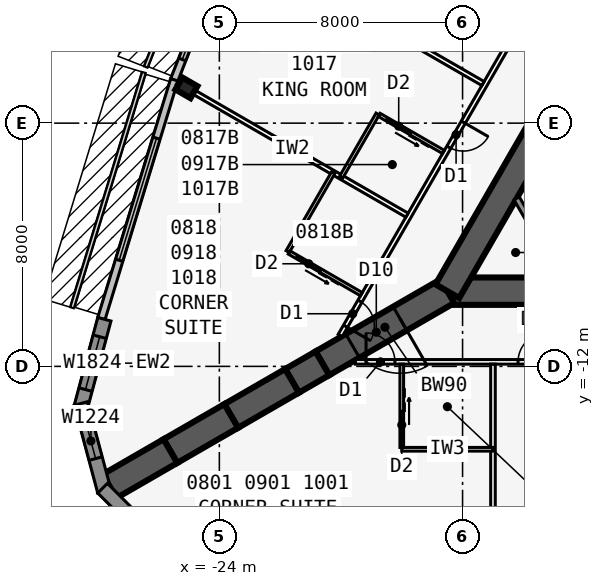
"""IFC4 building model, lengths in metres.
Left out: names, types, materials, properties, quantities, classifications, styles, units other than length and angle.
Written with IfcOpenShell. Run it as: python <this file> out.ifc"""

import sys

from ifc_helpers import new_model, si_unit, direction, frame, frame_2d, origin, origin_2d, place, context, subcontext, project, spatial, polyline, rectangle, i_section, outline, extrude, element, fill, save


model = new_model("IFC4")
c1 = context("Model", 3, precision=1e-05, world=origin(), true_north=direction((0.0, 1.0)))
c2 = subcontext(c1, "Body", "Model", "MODEL_VIEW")
j1 = project(units=[si_unit("LENGTHUNIT", "METRE"), si_unit("PLANEANGLEUNIT", "RADIAN")], contexts=[c1])
p1 = place(None, origin())
s1 = spatial("IfcSite", under=j1, at=p1, CompositionType="ELEMENT")
p2 = place(p1, origin())
s2 = spatial("IfcBuilding", under=s1, at=p2, CompositionType="ELEMENT")
p3 = place(p2, frame((0.0, 0.0, 38.7)))
s3 = spatial("IfcBuildingStorey", under=s2, at=p3, CompositionType="ELEMENT", Elevation=38.7)
p4 = place(p3, frame((-16.5, -9.526, 0.0), z_axis=(0.0, 0.0, 1.0), x_axis=(1.0, 0.0, 0.0)))
e1 = element("IfcWall", 1, at=p4, inside=s3, PredefinedType="SHEAR", context=c2, shape_type="SweptSolid", body=[
    extrude(rectangle(XDim=33.0, YDim=0.9, at=frame_2d((16.5, 0.0))), origin(), (0.0, 0.0, 1.0), 3.4),
])
p5 = place(p4, frame((14.05, 0.0, 0.0)))
e2 = element("IfcOpeningElement", 2, at=p5, cuts=e1, PredefinedType="OPENING", context=c2, shape_type="SweptSolid", body=[
    extrude(rectangle(XDim=1.8, YDim=2.13, at=frame_2d((0.9, 1.065))), frame((0.0, 0.46, 0.0), z_axis=(0.0, -1.0, 0.0), x_axis=(1.0, 0.0, 0.0)), (0.0, 0.0, 1.0), 0.92),
])
p6 = place(p3, frame((0.0, 19.052, 0.0), z_axis=(0.0, 0.0, 1.0), x_axis=(-0.499999749417, -0.866025548458, 0.0)))
e3 = element("IfcWall", 3, at=p6, inside=s3, PredefinedType="SHEAR", context=c2, shape_type="SweptSolid", body=[
    extrude(rectangle(XDim=33.0, YDim=0.9, at=frame_2d((16.5, 0.0))), origin(), (0.0, 0.0, 1.0), 3.4),
])
p7 = place(p6, frame((14.15, 0.0, 0.0)))
e4 = element("IfcOpeningElement", 4, at=p7, cuts=e3, PredefinedType="OPENING", context=c2, shape_type="SweptSolid", body=[
    extrude(rectangle(XDim=1.8, YDim=2.13, at=frame_2d((0.9, 1.065))), frame((0.0, 0.46, 0.0), z_axis=(0.0, -1.0, 0.0), x_axis=(1.0, 0.0, 0.0)), (0.0, 0.0, 1.0), 0.92),
])
p8 = place(p6, frame((12.6, 0.0, 0.0)))
e5 = element("IfcOpeningElement", 5, at=p8, cuts=e3, PredefinedType="OPENING", context=c2, shape_type="SweptSolid", body=[
    extrude(rectangle(XDim=1.0, YDim=2.13, at=frame_2d((0.5, 1.065))), frame((0.0, 0.46, 0.0), z_axis=(0.0, -1.0, 0.0), x_axis=(1.0, 0.0, 0.0)), (0.0, 0.0, 1.0), 0.92),
])
p9 = place(p3, frame((-16.5, -9.526, 0.0), z_axis=(0.0, 0.0, 1.0), x_axis=(-0.866031398331, -0.499989616998, 0.0)))
e6 = element("IfcWall", 6, at=p9, inside=s3, PredefinedType="SHEAR", context=c2, shape_type="SweptSolid", body=[
    extrude(rectangle(XDim=4.746, YDim=0.9, at=frame_2d((2.373, 0.0))), origin(), (0.0, 0.0, 1.0), 3.4),
])
p10 = place(p9, frame((1.8, 0.0, 0.0)))
e7 = element("IfcOpeningElement", 7, at=p10, cuts=e6, PredefinedType="OPENING", context=c2, shape_type="SweptSolid", body=[
    extrude(rectangle(XDim=1.8, YDim=2.13, at=frame_2d((0.9, 1.065))), frame((0.0, 0.46, 0.0), z_axis=(0.0, -1.0, 0.0), x_axis=(1.0, 0.0, 0.0)), (0.0, 0.0, 1.0), 0.92),
])
p11 = place(p3, frame((-20.61, -11.899, 0.0), z_axis=(0.0, 0.0, 1.0), x_axis=(-0.866009537788, -0.500027479704, 0.0)))
e8 = element("IfcWall", 8, at=p11, inside=s3, PredefinedType="SHEAR", context=c2, shape_type="SweptSolid", body=[
    extrude(rectangle(XDim=1.155, YDim=0.9, at=frame_2d((0.577, 0.0))), origin(), (0.0, 0.0, 1.0), 3.4),
])
for number, where, z_axis, x_axis in (
    (9, (-21.61, -12.477, 0.0), (0.0, 0.0, 1.0), (-0.866, -0.5, 0.0)),
    (10, (-23.61, -13.631, 0.0), (0.0, 0.0, 1.0), (-0.866, -0.5, 0.0)),
    (11, (-25.61, -14.786, 0.0), (0.0, 0.0, 1.0), (-0.866, -0.5, 0.0)),
):
    element("IfcWall", number, at=place(p3, frame(where, z_axis=z_axis, x_axis=x_axis)), inside=s3, PredefinedType="SHEAR", context=c2, shape_type="SweptSolid", body=[
        extrude(rectangle(XDim=2.309, YDim=0.9, at=frame_2d((1.155, 0.0))), origin(), (0.0, 0.0, 1.0), 3.4),
    ])
p12 = place(p3, frame((-25.083, -2.839, 0.0), z_axis=(0.0, 0.0, 1.0), x_axis=(-0.5, -0.866025403784, 0.0)))
e12 = element("IfcColumn", 12, at=p12, inside=s3, PredefinedType="COLUMN", context=c2, shape_type="SweptSolid", body=[
    extrude(i_section(OverallWidth=0.455, OverallDepth=0.569, WebThickness=0.078, FlangeThickness=0.125, at=origin_2d()), origin(), (0.0, 0.0, 1.0), 3.4),
])
p13 = place(p3, frame((-23.645, 2.126, 0.0), z_axis=(0.0, 0.0, 1.0), x_axis=(-0.364013463868, -0.931393685894, 0.0)))
e13 = element("IfcWall", 13, at=p13, inside=s3, PredefinedType="STANDARD", context=c2, shape_type="SweptSolid", body=[
    extrude(rectangle(XDim=5.058, YDim=0.25, at=frame_2d((2.529, 0.0))), origin(), (0.0, 0.0, 1.0), 3.235),
])
p14 = place(p13, frame((0.729, 0.0, 0.45)))
e14 = element("IfcOpeningElement", 14, at=p14, cuts=e13, PredefinedType="OPENING", context=c2, shape_type="SweptSolid", body=[
    extrude(rectangle(XDim=3.6, YDim=2.4, at=frame_2d((1.8, 1.2))), frame((0.0, 0.135, 0.0), z_axis=(0.0, -1.0, 0.0), x_axis=(1.0, 0.0, 0.0)), (0.0, 0.0, 1.0), 0.27),
])
p15 = place(p3, frame((-25.483, -2.575, 0.0), z_axis=(0.0, 0.0, 1.0), x_axis=(-0.2919790669, -0.956424709265, 0.0)))
e15 = element("IfcWall", 15, at=p15, inside=s3, PredefinedType="STANDARD", context=c2, shape_type="SweptSolid", body=[
    extrude(rectangle(XDim=8.211, YDim=0.25, at=frame_2d((4.105, 0.0))), origin(), (0.0, 0.0, 1.0), 3.235),
])
p16 = place(p15, frame((2.006, 0.0, 0.45)))
e16 = element("IfcOpeningElement", 16, at=p16, cuts=e15, PredefinedType="OPENING", context=c2, shape_type="SweptSolid", body=[
    extrude(rectangle(XDim=4.2, YDim=2.4, at=frame_2d((2.1, 1.2))), frame((0.0, 0.135, 0.0), z_axis=(0.0, -1.0, 0.0), x_axis=(1.0, 0.0, 0.0)), (0.0, 0.0, 1.0), 0.27),
])
p17 = place(p3, frame((-27.783, -10.45, 0.0), z_axis=(0.0, 0.0, 1.0), x_axis=(-0.258780998834, -0.965936019953, 0.0)))
e17 = element("IfcWall", 17, at=p17, inside=s3, PredefinedType="SOLIDWALL", context=c2, shape_type="SweptSolid", body=[
    extrude(rectangle(XDim=2.989, YDim=0.45, at=frame_2d((1.494, 0.0))), origin(), (0.0, 0.0, 1.0), 3.235),
])
p18 = place(p17, frame((0.594, 0.0, 0.45)))
e18 = element("IfcOpeningElement", 18, at=p18, cuts=e17, PredefinedType="OPENING", context=c2, shape_type="SweptSolid", body=[
    extrude(rectangle(XDim=1.8, YDim=2.4, at=frame_2d((0.9, 1.2))), frame((0.0, 0.235, 0.0), z_axis=(0.0, -1.0, 0.0), x_axis=(1.0, 0.0, 0.0)), (0.0, 0.0, 1.0), 0.47),
])
p19 = place(p3, frame((-28.556, -13.221, 0.0), z_axis=(0.0, 0.0, 1.0), x_axis=(0.258801419081, -0.965930548995, 0.0)))
e19 = element("IfcWall", 19, at=p19, inside=s3, PredefinedType="SOLIDWALL", context=c2, shape_type="SweptSolid", body=[
    extrude(outline(polyline([(2.989, 0.225), (2.929, 0.225), (2.437, 0.093), (2.402, 0.225), (0.0, 0.225), (0.0, -0.225), (2.989, -0.225), (2.989, 0.225)])), origin(), (0.0, 0.0, 1.0), 3.235),
])
p20 = place(p19, frame((0.676, 0.0, 0.45)))
e20 = element("IfcOpeningElement", 20, at=p20, cuts=e19, PredefinedType="OPENING", context=c2, shape_type="SweptSolid", body=[
    extrude(rectangle(XDim=1.2, YDim=2.4, at=frame_2d((0.6, 1.2))), frame((0.0, 0.235, 0.0), z_axis=(0.0, -1.0, 0.0), x_axis=(1.0, 0.0, 0.0)), (0.0, 0.0, 1.0), 0.47),
])
p21 = place(p3, frame((-27.841, -16.007, 0.0), z_axis=(0.0, 0.0, 1.0), x_axis=(0.707025086683, -0.707188466253, 0.0)))
e21 = element("IfcWall", 21, at=p21, inside=s3, PredefinedType="SOLIDWALL", context=c2, shape_type="SweptSolid", body=[
    extrude(outline(polyline([(2.989, 0.225), (0.586, 0.225), (0.551, 0.093), (0.059, 0.225), (0.0, 0.225), (0.0, -0.225), (2.989, -0.225), (2.989, 0.225)])), origin(), (0.0, 0.0, 1.0), 3.235),
])
p22 = place(p21, frame((1.113, 0.0, 0.45)))
e22 = element("IfcOpeningElement", 22, at=p22, cuts=e21, PredefinedType="OPENING", context=c2, shape_type="SweptSolid", body=[
    extrude(rectangle(XDim=1.2, YDim=2.4, at=frame_2d((0.6, 1.2))), frame((0.0, 0.235, 0.0), z_axis=(0.0, -1.0, 0.0), x_axis=(1.0, 0.0, 0.0)), (0.0, 0.0, 1.0), 0.47),
])
p23 = place(p3, frame((-19.527, -11.851, 0.0), z_axis=(0.0, 0.0, 1.0), x_axis=(1.0, 0.0, 0.0)))
e23 = element("IfcWall", 23, at=p23, inside=s3, PredefinedType="PARTITIONING", context=c2, shape_type="SweptSolid", body=[
    extrude(rectangle(XDim=39.054, YDim=0.15, at=frame_2d((19.527, 0.0))), origin(), (0.0, 0.0, 1.0), 3.235),
])
p24 = place(p23, frame((0.352, 0.0, 0.0)))
e24 = element("IfcOpeningElement", 24, at=p24, cuts=e23, PredefinedType="OPENING", context=c2, shape_type="SweptSolid", body=[
    extrude(rectangle(XDim=0.95, YDim=2.13, at=frame_2d((0.475, 1.065))), frame((0.0, 0.085, 0.0), z_axis=(0.0, -1.0, 0.0), x_axis=(1.0, 0.0, 0.0)), (0.0, 0.0, 1.0), 0.17),
])
p25 = place(p23, frame((5.352, 0.0, 0.0)))
e25 = element("IfcOpeningElement", 25, at=p25, cuts=e23, PredefinedType="OPENING", context=c2, shape_type="SweptSolid", body=[
    extrude(rectangle(XDim=0.95, YDim=2.13, at=frame_2d((0.475, 1.065))), frame((0.0, 0.085, 0.0), z_axis=(0.0, -1.0, 0.0), x_axis=(1.0, 0.0, 0.0)), (0.0, 0.0, 1.0), 0.17),
])
p26 = place(p23, frame((12.752, 0.0, 0.0)))
e26 = element("IfcOpeningElement", 26, at=p26, cuts=e23, PredefinedType="OPENING", context=c2, shape_type="SweptSolid", body=[
    extrude(rectangle(XDim=0.95, YDim=2.13, at=frame_2d((0.475, 1.065))), frame((0.0, 0.085, 0.0), z_axis=(0.0, -1.0, 0.0), x_axis=(1.0, 0.0, 0.0)), (0.0, 0.0, 1.0), 0.17),
])
p27 = place(p23, frame((21.527, 0.0, 0.0)))
e27 = element("IfcOpeningElement", 27, at=p27, cuts=e23, PredefinedType="OPENING", context=c2, shape_type="SweptSolid", body=[
    extrude(rectangle(XDim=1.0, YDim=2.13, at=frame_2d((0.5, 1.065))), frame((0.0, 0.085, 0.0), z_axis=(0.0, -1.0, 0.0), x_axis=(1.0, 0.0, 0.0)), (0.0, 0.0, 1.0), 0.17),
])
p28 = place(p23, frame((25.952, 0.0, 0.0)))
e28 = element("IfcOpeningElement", 28, at=p28, cuts=e23, PredefinedType="OPENING", context=c2, shape_type="SweptSolid", body=[
    extrude(rectangle(XDim=0.95, YDim=2.13, at=frame_2d((0.475, 1.065))), frame((0.0, 0.085, 0.0), z_axis=(0.0, -1.0, 0.0), x_axis=(1.0, 0.0, 0.0)), (0.0, 0.0, 1.0), 0.17),
])
p29 = place(p23, frame((36.546, 0.0, 0.0)))
e29 = element("IfcOpeningElement", 29, at=p29, cuts=e23, PredefinedType="OPENING", context=c2, shape_type="SweptSolid", body=[
    extrude(rectangle(XDim=0.95, YDim=2.13, at=frame_2d((0.475, 1.065))), frame((0.0, 0.085, 0.0), z_axis=(0.0, -1.0, 0.0), x_axis=(1.0, 0.0, 0.0)), (0.0, 0.0, 1.0), 0.17),
])
p30 = place(p3, frame((-15.0, -11.926, 0.0), z_axis=(0.0, 0.0, 1.0), x_axis=(0.0, -1.0, 0.0)))
e30 = element("IfcWall", 30, at=p30, inside=s3, PredefinedType="PARTITIONING", context=c2, shape_type="SweptSolid", body=[
    extrude(rectangle(XDim=8.72, YDim=0.15, at=frame_2d((4.36, 0.0))), origin(), (0.0, 0.0, 1.0), 2.389),
])
p31 = place(p3, frame((-18.0, -14.726, 0.0), z_axis=(0.0, 0.0, 1.0), x_axis=(1.0, 0.0, 0.0)))
e31 = element("IfcWall", 31, at=p31, inside=s3, PredefinedType="PLUMBINGWALL", context=c2, shape_type="SweptSolid", body=[
    extrude(rectangle(XDim=3.0, YDim=0.12, at=frame_2d((1.5, 0.0))), origin(), (0.0, 0.0, 1.0), 3.235),
])
p32 = place(p3, frame((-18.0, -11.926, 0.0), z_axis=(0.0, 0.0, 1.0), x_axis=(0.0, -1.0, 0.0)))
e32 = element("IfcWall", 32, at=p32, inside=s3, PredefinedType="PLUMBINGWALL", context=c2, shape_type="SweptSolid", body=[
    extrude(rectangle(XDim=2.74, YDim=0.12, at=frame_2d((1.37, 0.0))), origin(), (0.0, 0.0, 1.0), 3.235),
])
p33 = place(p32, frame((1.55, 0.0, 0.0)))
e33 = element("IfcOpeningElement", 33, at=p33, cuts=e32, PredefinedType="OPENING", context=c2, shape_type="SweptSolid", body=[
    extrude(rectangle(XDim=0.9, YDim=2.13, at=frame_2d((0.45, 1.065))), frame((0.0, 0.07, 0.0), z_axis=(0.0, -1.0, 0.0), x_axis=(1.0, 0.0, 0.0)), (0.0, 0.0, 1.0), 0.14),
])
p34 = place(p3, frame((-0.5, 22.836, 0.0), z_axis=(0.0, 0.0, 1.0), x_axis=(-0.500001677587, -0.866024435227, 0.0)))
e34 = element("IfcWall", 34, at=p34, inside=s3, PredefinedType="PARTITIONING", context=c2, shape_type="SweptSolid", body=[
    extrude(rectangle(XDim=39.054, YDim=0.15, at=frame_2d((19.527, 0.0))), origin(), (0.0, 0.0, 1.0), 3.235),
])
p35 = place(p34, frame((0.352, 0.0, 0.0)))
e35 = element("IfcOpeningElement", 35, at=p35, cuts=e34, PredefinedType="OPENING", context=c2, shape_type="SweptSolid", body=[
    extrude(rectangle(XDim=0.95, YDim=2.13, at=frame_2d((0.475, 1.065))), frame((0.0, 0.085, 0.0), z_axis=(0.0, -1.0, 0.0), x_axis=(1.0, 0.0, 0.0)), (0.0, 0.0, 1.0), 0.17),
])
p36 = place(p34, frame((5.952, 0.0, 0.0)))
e36 = element("IfcOpeningElement", 36, at=p36, cuts=e34, PredefinedType="OPENING", context=c2, shape_type="SweptSolid", body=[
    extrude(rectangle(XDim=0.95, YDim=2.13, at=frame_2d((0.475, 1.065))), frame((0.0, 0.085, 0.0), z_axis=(0.0, -1.0, 0.0), x_axis=(1.0, 0.0, 0.0)), (0.0, 0.0, 1.0), 0.17),
])
p37 = place(p34, frame((11.552, 0.0, 0.0)))
e37 = element("IfcOpeningElement", 37, at=p37, cuts=e34, PredefinedType="OPENING", context=c2, shape_type="SweptSolid", body=[
    extrude(rectangle(XDim=0.95, YDim=2.13, at=frame_2d((0.475, 1.065))), frame((0.0, 0.085, 0.0), z_axis=(0.0, -1.0, 0.0), x_axis=(1.0, 0.0, 0.0)), (0.0, 0.0, 1.0), 0.17),
])
p38 = place(p34, frame((21.552, 0.0, 0.0)))
e38 = element("IfcOpeningElement", 38, at=p38, cuts=e34, PredefinedType="OPENING", context=c2, shape_type="SweptSolid", body=[
    extrude(rectangle(XDim=0.95, YDim=2.13, at=frame_2d((0.475, 1.065))), frame((0.0, 0.085, 0.0), z_axis=(0.0, -1.0, 0.0), x_axis=(1.0, 0.0, 0.0)), (0.0, 0.0, 1.0), 0.17),
])
p39 = place(p34, frame((30.952, 0.0, 0.0)))
e39 = element("IfcOpeningElement", 39, at=p39, cuts=e34, PredefinedType="OPENING", context=c2, shape_type="SweptSolid", body=[
    extrude(rectangle(XDim=0.95, YDim=2.13, at=frame_2d((0.475, 1.065))), frame((0.0, 0.085, 0.0), z_axis=(0.0, -1.0, 0.0), x_axis=(1.0, 0.0, 0.0)), (0.0, 0.0, 1.0), 0.17),
])
p40 = place(p34, frame((37.752, 0.0, 0.0)))
e40 = element("IfcOpeningElement", 40, at=p40, cuts=e34, PredefinedType="OPENING", context=c2, shape_type="SweptSolid", body=[
    extrude(rectangle(XDim=0.95, YDim=2.13, at=frame_2d((0.475, 1.065))), frame((0.0, 0.085, 0.0), z_axis=(0.0, -1.0, 0.0), x_axis=(1.0, 0.0, 0.0)), (0.0, 0.0, 1.0), 0.17),
])
p41 = place(p3, frame((-15.329, -2.697, 0.0), z_axis=(0.0, 0.0, 1.0), x_axis=(-0.866018409083, 0.500012114982, 0.0)))
e41 = element("IfcWall", 41, at=p41, inside=s3, PredefinedType="PARTITIONING", context=c2, shape_type="SweptSolid", body=[
    extrude(rectangle(XDim=9.485, YDim=0.15, at=frame_2d((4.742, 0.0))), origin(), (0.0, 0.0, 1.0), 2.389),
])
p42 = place(p3, frame((-17.829, -7.027, 0.0), z_axis=(0.0, 0.0, 1.0), x_axis=(-0.866032659912, 0.499987431809, 0.0)))
e42 = element("IfcWall", 42, at=p42, inside=s3, PredefinedType="PARTITIONING", context=c2, shape_type="SweptSolid", body=[
    extrude(rectangle(XDim=8.72, YDim=0.15, at=frame_2d((4.36, 0.0))), origin(), (0.0, 0.0, 1.0), 2.389),
])
p43 = place(p3, frame((-18.793, -3.699, 0.0), z_axis=(0.0, 0.0, 1.0), x_axis=(-0.500001309137, -0.866024647952, 0.0)))
e43 = element("IfcWall", 43, at=p43, inside=s3, PredefinedType="PLUMBINGWALL", context=c2, shape_type="SweptSolid", body=[
    extrude(rectangle(XDim=2.4, YDim=0.12, at=frame_2d((1.2, 0.0))), origin(), (0.0, 0.0, 1.0), 3.235),
])
p44 = place(p3, frame((-16.628, -4.949, 0.0), z_axis=(0.0, 0.0, 1.0), x_axis=(-0.866048967903, 0.499959183527, 0.0)))
e44 = element("IfcWall", 44, at=p44, inside=s3, PredefinedType="PLUMBINGWALL", context=c2, shape_type="SweptSolid", body=[
    extrude(rectangle(XDim=2.44, YDim=0.12, at=frame_2d((1.22, 0.0))), origin(), (0.0, 0.0, 1.0), 3.235),
])
p45 = place(p44, frame((1.25, 0.0, 0.0)))
e45 = element("IfcOpeningElement", 45, at=p45, cuts=e44, PredefinedType="OPENING", context=c2, shape_type="SweptSolid", body=[
    extrude(rectangle(XDim=0.9, YDim=2.13, at=frame_2d((0.45, 1.065))), frame((0.0, 0.07, 0.0), z_axis=(0.0, -1.0, 0.0), x_axis=(1.0, 0.0, 0.0)), (0.0, 0.0, 1.0), 0.14),
])
p46 = place(p3, frame((-20.253, -5.627, 0.0), z_axis=(0.0, 0.0, 1.0), x_axis=(-0.499990139034, -0.866031096941, 0.0)))
e46 = element("IfcWall", 46, at=p46, inside=s3, PredefinedType="PLUMBINGWALL", context=c2, shape_type="SweptSolid", body=[
    extrude(rectangle(XDim=3.0, YDim=0.12, at=frame_2d((1.5, 0.0))), origin(), (0.0, 0.0, 1.0), 3.235),
])
p47 = place(p3, frame((-19.329, -9.625, 0.0), z_axis=(0.0, 0.0, 1.0), x_axis=(-0.866035715982, 0.499982138324, 0.0)))
e47 = element("IfcWall", 47, at=p47, inside=s3, PredefinedType="PLUMBINGWALL", context=c2, shape_type="SweptSolid", body=[
    extrude(rectangle(XDim=2.74, YDim=0.12, at=frame_2d((1.37, 0.0))), origin(), (0.0, 0.0, 1.0), 3.235),
])
p48 = place(p47, frame((1.55, 0.0, 0.0)))
e48 = element("IfcOpeningElement", 48, at=p48, cuts=e47, PredefinedType="OPENING", context=c2, shape_type="SweptSolid", body=[
    extrude(rectangle(XDim=0.9, YDim=2.13, at=frame_2d((0.45, 1.065))), frame((0.0, 0.07, 0.0), z_axis=(0.0, -1.0, 0.0), x_axis=(1.0, 0.0, 0.0)), (0.0, 0.0, 1.0), 0.14),
])
p49 = place(p3, frame((-12.719, -9.076, 0.0), z_axis=(0.0, 0.0, 1.0), x_axis=(-0.499952404951, 0.866052881055, 0.0)))
e49 = element("IfcWall", 49, at=p49, inside=s3, PredefinedType="SOLIDWALL", context=c2, shape_type="SweptSolid", body=[
    extrude(rectangle(XDim=3.002, YDim=0.2, at=frame_2d((1.501, 0.0))), origin(), (0.0, 0.0, 1.0), 3.235),
])
p50 = place(p14, origin())
e50 = element("IfcWindow", 50, at=p50, inside=s3, PartitioningType="SINGLE_PANEL", PredefinedType="WINDOW", context=c2, shape_type="SweptSolid", body=[
    extrude(rectangle(XDim=3.6, YDim=2.4, at=frame_2d((1.8, 1.2))), frame((0.0, 0.03, 0.0), z_axis=(0.0, -1.0, 0.0), x_axis=(1.0, 0.0, 0.0)), (0.0, 0.0, 1.0), 0.06),
])
fill(e14, e50)
p51 = place(p16, origin())
e51 = element("IfcWindow", 51, at=p51, inside=s3, PartitioningType="SINGLE_PANEL", PredefinedType="WINDOW", context=c2, shape_type="SweptSolid", body=[
    extrude(rectangle(XDim=4.2, YDim=2.4, at=frame_2d((2.1, 1.2))), frame((0.0, 0.03, 0.0), z_axis=(0.0, -1.0, 0.0), x_axis=(1.0, 0.0, 0.0)), (0.0, 0.0, 1.0), 0.06),
])
fill(e16, e51)
p52 = place(p18, origin())
e52 = element("IfcWindow", 52, at=p52, inside=s3, PartitioningType="SINGLE_PANEL", PredefinedType="WINDOW", context=c2, shape_type="SweptSolid", body=[
    extrude(rectangle(XDim=1.8, YDim=2.4, at=frame_2d((0.9, 1.2))), frame((0.0, 0.03, 0.0), z_axis=(0.0, -1.0, 0.0), x_axis=(1.0, 0.0, 0.0)), (0.0, 0.0, 1.0), 0.06),
])
fill(e18, e52)
p53 = place(p20, origin())
e53 = element("IfcWindow", 53, at=p53, inside=s3, PartitioningType="SINGLE_PANEL", PredefinedType="WINDOW", context=c2, shape_type="SweptSolid", body=[
    extrude(rectangle(XDim=1.2, YDim=2.4, at=frame_2d((0.6, 1.2))), frame((0.0, 0.03, 0.0), z_axis=(0.0, -1.0, 0.0), x_axis=(1.0, 0.0, 0.0)), (0.0, 0.0, 1.0), 0.06),
])
fill(e20, e53)
p54 = place(p33, origin())
e54 = element("IfcDoor", 54, at=p54, inside=s3, OperationType="SLIDING_TO_LEFT", PredefinedType="DOOR", context=c2, shape_type="SweptSolid", body=[
    extrude(rectangle(XDim=0.9, YDim=2.13, at=frame_2d((0.45, 1.065))), frame((0.0, 0.025, 0.0), z_axis=(0.0, -1.0, 0.0), x_axis=(1.0, 0.0, 0.0)), (0.0, 0.0, 1.0), 0.05),
])
fill(e33, e54)
p55 = place(p24, origin())
e55 = element("IfcDoor", 55, at=p55, inside=s3, OperationType="SINGLE_SWING_LEFT", PredefinedType="DOOR", context=c2, shape_type="SweptSolid", body=[
    extrude(rectangle(XDim=0.95, YDim=2.13, at=frame_2d((0.475, 1.065))), frame((0.0, 0.025, 0.0), z_axis=(0.0, -1.0, 0.0), x_axis=(1.0, 0.0, 0.0)), (0.0, 0.0, 1.0), 0.05),
])
fill(e24, e55)
p56 = place(p25, origin())
e56 = element("IfcDoor", 56, at=p56, inside=s3, OperationType="SINGLE_SWING_RIGHT", PredefinedType="DOOR", context=c2, shape_type="SweptSolid", body=[
    extrude(rectangle(XDim=0.95, YDim=2.13, at=frame_2d((0.475, 1.065))), frame((0.0, 0.025, 0.0), z_axis=(0.0, -1.0, 0.0), x_axis=(1.0, 0.0, 0.0)), (0.0, 0.0, 1.0), 0.05),
])
fill(e25, e56)
p57 = place(p45, origin())
e57 = element("IfcDoor", 57, at=p57, inside=s3, OperationType="SLIDING_TO_LEFT", PredefinedType="DOOR", context=c2, shape_type="SweptSolid", body=[
    extrude(rectangle(XDim=0.9, YDim=2.13, at=frame_2d((0.45, 1.065))), frame((0.0, 0.025, 0.0), z_axis=(0.0, -1.0, 0.0), x_axis=(1.0, 0.0, 0.0)), (0.0, 0.0, 1.0), 0.05),
])
fill(e45, e57)
p58 = place(p39, origin())
e58 = element("IfcDoor", 58, at=p58, inside=s3, OperationType="SINGLE_SWING_LEFT", PredefinedType="DOOR", context=c2, shape_type="SweptSolid", body=[
    extrude(rectangle(XDim=0.95, YDim=2.13, at=frame_2d((0.475, 1.065))), frame((0.0, 0.025, 0.0), z_axis=(0.0, -1.0, 0.0), x_axis=(1.0, 0.0, 0.0)), (0.0, 0.0, 1.0), 0.05),
])
fill(e39, e58)
p59 = place(p48, origin())
e59 = element("IfcDoor", 59, at=p59, inside=s3, OperationType="SLIDING_TO_LEFT", PredefinedType="DOOR", context=c2, shape_type="SweptSolid", body=[
    extrude(rectangle(XDim=0.9, YDim=2.13, at=frame_2d((0.45, 1.065))), frame((0.0, 0.025, 0.0), z_axis=(0.0, -1.0, 0.0), x_axis=(1.0, 0.0, 0.0)), (0.0, 0.0, 1.0), 0.05),
])
fill(e48, e59)
p60 = place(p40, origin())
e60 = element("IfcDoor", 60, at=p60, inside=s3, OperationType="SINGLE_SWING_RIGHT", PredefinedType="DOOR", context=c2, shape_type="SweptSolid", body=[
    extrude(rectangle(XDim=0.95, YDim=2.13, at=frame_2d((0.475, 1.065))), frame((0.0, 0.025, 0.0), z_axis=(0.0, -1.0, 0.0), x_axis=(1.0, 0.0, 0.0)), (0.0, 0.0, 1.0), 0.05),
])
fill(e40, e60)
p61 = place(p10, origin())
e61 = element("IfcDoor", 61, at=p61, inside=s3, OperationType="DOUBLE_DOOR_DOUBLE_SWING", PredefinedType="DOOR", context=c2, shape_type="SweptSolid", body=[
    extrude(rectangle(XDim=1.8, YDim=2.13, at=frame_2d((0.9, 1.065))), frame((0.0, 0.025, 0.0), z_axis=(0.0, -1.0, 0.0), x_axis=(1.0, 0.0, 0.0)), (0.0, 0.0, 1.0), 0.05),
])
fill(e7, e61)
save(model, sys.argv[1])
